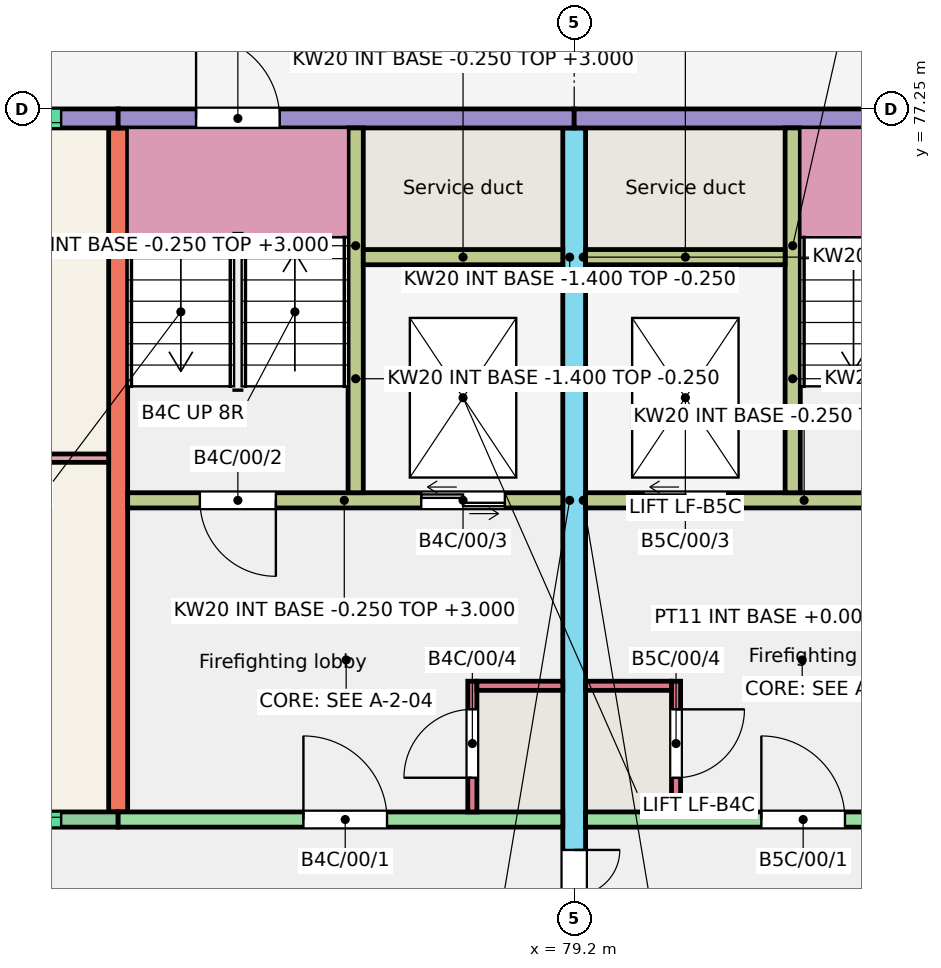
"""IFC4 building model, lengths in metres.
Left out: names, types, materials, properties, quantities, classifications, styles, units other than length and angle.
Written with IfcOpenShell. Run it as: python <this file> out.ifc"""

import sys

from ifc_helpers import new_model, si_unit, direction, frame, frame_2d, origin, place, context, subcontext, project, spatial, rectangle, extrude, element, fill, save


model = new_model("IFC4")
c1 = context("Model", 3, precision=1e-05, world=origin(), true_north=direction((0.0, 1.0)))
c2 = subcontext(c1, "Body", "Model", "MODEL_VIEW")
j1 = project(units=[si_unit("LENGTHUNIT", "METRE"), si_unit("PLANEANGLEUNIT", "RADIAN")], contexts=[c1])
p1 = place(None, origin())
s1 = spatial("IfcSite", under=j1, at=p1, CompositionType="ELEMENT")
p2 = place(p1, origin())
s2 = spatial("IfcBuilding", under=s1, at=p2, CompositionType="ELEMENT")
p3 = place(p2, origin())
s3 = spatial("IfcBuildingStorey", under=s2, at=p3, CompositionType="ELEMENT", Elevation=0.0)
p4 = place(p3, frame((73.2, 68.0, -0.25), z_axis=(0.0, 0.0, 1.0), x_axis=(0.0, 1.0, 0.0)))
e1 = element("IfcWall", 1, at=p4, inside=s3, PredefinedType="SHEAR", context=c2, shape_type="SweptSolid", body=[
    extrude(rectangle(XDim=9.0, YDim=0.25, at=frame_2d((4.5, 0.0))), origin(), (0.0, 0.0, 1.0), 3.25),
])
p5 = place(p3, frame((79.2, 66.0, -0.25), z_axis=(0.0, 0.0, 1.0), x_axis=(0.0, 1.0, 0.0)))
e2 = element("IfcWall", 2, at=p5, inside=s3, PredefinedType="SHEAR", context=c2, shape_type="SweptSolid", body=[
    extrude(rectangle(XDim=11.0, YDim=0.3, at=frame_2d((5.5, 0.0))), origin(), (0.0, 0.0, 1.0), 3.25),
])
p6 = place(p5, frame((0.3, 0.0, 0.25)))
e3 = element("IfcOpeningElement", 3, at=p6, cuts=e2, PredefinedType="OPENING", context=c2, shape_type="SweptSolid", body=[
    extrude(rectangle(XDim=1.2, YDim=2.1, at=frame_2d((0.6, 1.05))), frame((0.0, 0.16, 0.0), z_axis=(0.0, -1.0, 0.0), x_axis=(1.0, 0.0, 0.0)), (0.0, 0.0, 1.0), 0.32),
])
p7 = place(p3, frame((69.6, 77.125, -0.25), z_axis=(0.0, 0.0, 1.0), x_axis=(1.0, 0.0, 0.0)))
e4 = element("IfcWall", 4, at=p7, inside=s3, PredefinedType="SOLIDWALL", context=c2, shape_type="SweptSolid", body=[
    extrude(rectangle(XDim=3.6, YDim=0.25, at=frame_2d((1.8, 0.0))), origin(), (0.0, 0.0, 1.0), 3.25),
])
p8 = place(p7, frame((0.75, 0.0, 1.45)))
e5 = element("IfcOpeningElement", 5, at=p8, cuts=e4, PredefinedType="OPENING", context=c2, shape_type="SweptSolid", body=[
    extrude(rectangle(XDim=2.1, YDim=1.2, at=frame_2d((1.05, 0.6))), frame((0.0, 0.135, 0.0), z_axis=(0.0, -1.0, 0.0), x_axis=(1.0, 0.0, 0.0)), (0.0, 0.0, 1.0), 0.27),
])
p9 = place(p3, frame((69.6, 67.9, -0.25), z_axis=(0.0, 0.0, 1.0), x_axis=(1.0, 0.0, 0.0)))
e6 = element("IfcWall", 6, at=p9, inside=s3, PredefinedType="SOLIDWALL", context=c2, shape_type="SweptSolid", body=[
    extrude(rectangle(XDim=3.6, YDim=0.2, at=frame_2d((1.8, 0.0))), origin(), (0.0, 0.0, 1.0), 3.25),
])
p10 = place(p9, frame((0.75, 0.0, 1.45)))
e7 = element("IfcOpeningElement", 7, at=p10, cuts=e6, PredefinedType="OPENING", context=c2, shape_type="SweptSolid", body=[
    extrude(rectangle(XDim=2.1, YDim=1.2, at=frame_2d((1.05, 0.6))), frame((0.0, 0.11, 0.0), z_axis=(0.0, -1.0, 0.0), x_axis=(1.0, 0.0, 0.0)), (0.0, 0.0, 1.0), 0.22),
])
p11 = place(p3, frame((73.2, 77.125, -0.25), z_axis=(0.0, 0.0, 1.0), x_axis=(1.0, 0.0, 0.0)))
e8 = element("IfcWall", 8, at=p11, inside=s3, PredefinedType="SOLIDWALL", context=c2, shape_type="SweptSolid", body=[
    extrude(rectangle(XDim=6.0, YDim=0.25, at=frame_2d((3.0, 0.0))), origin(), (0.0, 0.0, 1.0), 3.25),
])
p12 = place(p11, frame((1.025, 0.0, 0.25)))
e9 = element("IfcOpeningElement", 9, at=p12, cuts=e8, PredefinedType="OPENING", context=c2, shape_type="SweptSolid", body=[
    extrude(rectangle(XDim=1.1, YDim=2.1, at=frame_2d((0.55, 1.05))), frame((0.0, 0.135, 0.0), z_axis=(0.0, -1.0, 0.0), x_axis=(1.0, 0.0, 0.0)), (0.0, 0.0, 1.0), 0.27),
])
p13 = place(p3, frame((73.2, 67.9, -0.25), z_axis=(0.0, 0.0, 1.0), x_axis=(1.0, 0.0, 0.0)))
e10 = element("IfcWall", 10, at=p13, inside=s3, PredefinedType="SHEAR", context=c2, shape_type="SweptSolid", body=[
    extrude(rectangle(XDim=5.85, YDim=0.2, at=frame_2d((2.925, 0.0))), origin(), (0.0, 0.0, 1.0), 3.25),
])
p14 = place(p13, frame((2.438, 0.0, 0.25)))
e11 = element("IfcOpeningElement", 11, at=p14, cuts=e10, PredefinedType="OPENING", context=c2, shape_type="SweptSolid", body=[
    extrude(rectangle(XDim=1.1, YDim=2.1, at=frame_2d((0.55, 1.05))), frame((0.0, 0.11, 0.0), z_axis=(0.0, -1.0, 0.0), x_axis=(1.0, 0.0, 0.0)), (0.0, 0.0, 1.0), 0.22),
])
p15 = place(p3, frame((73.325, 72.1, -0.25), z_axis=(0.0, 0.0, 1.0), x_axis=(1.0, 0.0, 0.0)))
e12 = element("IfcWall", 12, at=p15, inside=s3, PredefinedType="SHEAR", context=c2, shape_type="SweptSolid", body=[
    extrude(rectangle(XDim=5.725, YDim=0.2, at=frame_2d((2.863, 0.0))), origin(), (0.0, 0.0, 1.0), 3.25),
])
p16 = place(p15, frame((0.95, 0.0, 0.25)))
e13 = element("IfcOpeningElement", 13, at=p16, cuts=e12, PredefinedType="OPENING", context=c2, shape_type="SweptSolid", body=[
    extrude(rectangle(XDim=1.0, YDim=2.1, at=frame_2d((0.5, 1.05))), frame((0.0, 0.11, 0.0), z_axis=(0.0, -1.0, 0.0), x_axis=(1.0, 0.0, 0.0)), (0.0, 0.0, 1.0), 0.22),
])
p17 = place(p15, frame((3.863, 0.0, 0.25)))
e14 = element("IfcOpeningElement", 14, at=p17, cuts=e12, PredefinedType="OPENING", context=c2, shape_type="SweptSolid", body=[
    extrude(rectangle(XDim=1.1, YDim=2.1, at=frame_2d((0.55, 1.05))), frame((0.0, 0.11, 0.0), z_axis=(0.0, -1.0, 0.0), x_axis=(1.0, 0.0, 0.0)), (0.0, 0.0, 1.0), 0.22),
])
p18 = place(p3, frame((76.325, 72.2, -0.25), z_axis=(0.0, 0.0, 1.0), x_axis=(0.0, 1.0, 0.0)))
e15 = element("IfcWall", 15, at=p18, inside=s3, PredefinedType="SHEAR", context=c2, shape_type="SweptSolid", body=[
    extrude(rectangle(XDim=4.8, YDim=0.2, at=frame_2d((2.4, 0.0))), origin(), (0.0, 0.0, 1.0), 3.25),
])
p19 = place(p3, frame((76.425, 75.3, -0.25), z_axis=(0.0, 0.0, 1.0), x_axis=(1.0, 0.0, 0.0)))
e16 = element("IfcWall", 16, at=p19, inside=s3, PredefinedType="SHEAR", context=c2, shape_type="SweptSolid", body=[
    extrude(rectangle(XDim=2.625, YDim=0.2, at=frame_2d((1.312, 0.0))), origin(), (0.0, 0.0, 1.0), 3.25),
])
p20 = place(p3, frame((77.86, 68.0, -0.25), z_axis=(0.0, 0.0, 1.0), x_axis=(0.0, 1.0, 0.0)))
e17 = element("IfcWall", 17, at=p20, inside=s3, PredefinedType="SHEAR", context=c2, shape_type="SweptSolid", body=[
    extrude(rectangle(XDim=1.72, YDim=0.12, at=frame_2d((0.86, 0.0))), origin(), (0.0, 0.0, 1.0), 3.25),
])
p21 = place(p20, frame((0.45, 0.0, 0.25)))
e18 = element("IfcOpeningElement", 18, at=p21, cuts=e17, PredefinedType="OPENING", context=c2, shape_type="SweptSolid", body=[
    extrude(rectangle(XDim=0.9, YDim=2.1, at=frame_2d((0.45, 1.05))), frame((0.0, 0.07, 0.0), z_axis=(0.0, -1.0, 0.0), x_axis=(1.0, 0.0, 0.0)), (0.0, 0.0, 1.0), 0.14),
])
p22 = place(p3, frame((77.92, 69.66, -0.25), z_axis=(0.0, 0.0, 1.0), x_axis=(1.0, 0.0, 0.0)))
e19 = element("IfcWall", 19, at=p22, inside=s3, PredefinedType="SHEAR", context=c2, shape_type="SweptSolid", body=[
    extrude(rectangle(XDim=1.13, YDim=0.12, at=frame_2d((0.565, 0.0))), origin(), (0.0, 0.0, 1.0), 3.25),
])
p23 = place(p3, frame((79.2, 77.125, -0.25), z_axis=(0.0, 0.0, 1.0), x_axis=(1.0, 0.0, 0.0)))
e20 = element("IfcWall", 20, at=p23, inside=s3, PredefinedType="SOLIDWALL", context=c2, shape_type="SweptSolid", body=[
    extrude(rectangle(XDim=6.0, YDim=0.25, at=frame_2d((3.0, 0.0))), origin(), (0.0, 0.0, 1.0), 3.25),
])
p24 = place(p23, frame((3.875, 0.0, 0.25)))
e21 = element("IfcOpeningElement", 21, at=p24, cuts=e20, PredefinedType="OPENING", context=c2, shape_type="SweptSolid", body=[
    extrude(rectangle(XDim=1.1, YDim=2.1, at=frame_2d((0.55, 1.05))), frame((0.0, 0.135, 0.0), z_axis=(0.0, -1.0, 0.0), x_axis=(1.0, 0.0, 0.0)), (0.0, 0.0, 1.0), 0.27),
])
p25 = place(p3, frame((79.35, 67.9, -0.25), z_axis=(0.0, 0.0, 1.0), x_axis=(1.0, 0.0, 0.0)))
e22 = element("IfcWall", 22, at=p25, inside=s3, PredefinedType="SHEAR", context=c2, shape_type="SweptSolid", body=[
    extrude(rectangle(XDim=5.85, YDim=0.2, at=frame_2d((2.925, 0.0))), origin(), (0.0, 0.0, 1.0), 3.25),
])
p26 = place(p25, frame((2.312, 0.0, 0.25)))
e23 = element("IfcOpeningElement", 23, at=p26, cuts=e22, PredefinedType="OPENING", context=c2, shape_type="SweptSolid", body=[
    extrude(rectangle(XDim=1.1, YDim=2.1, at=frame_2d((0.55, 1.05))), frame((0.0, 0.11, 0.0), z_axis=(0.0, -1.0, 0.0), x_axis=(1.0, 0.0, 0.0)), (0.0, 0.0, 1.0), 0.22),
])
p27 = place(p3, frame((79.35, 72.1, -0.25), z_axis=(0.0, 0.0, 1.0), x_axis=(1.0, 0.0, 0.0)))
e24 = element("IfcWall", 24, at=p27, inside=s3, PredefinedType="SHEAR", context=c2, shape_type="SweptSolid", body=[
    extrude(rectangle(XDim=5.725, YDim=0.2, at=frame_2d((2.862, 0.0))), origin(), (0.0, 0.0, 1.0), 3.25),
])
p28 = place(p27, frame((3.775, 0.0, 0.25)))
e25 = element("IfcOpeningElement", 25, at=p28, cuts=e24, PredefinedType="OPENING", context=c2, shape_type="SweptSolid", body=[
    extrude(rectangle(XDim=1.0, YDim=2.1, at=frame_2d((0.5, 1.05))), frame((0.0, 0.11, 0.0), z_axis=(0.0, -1.0, 0.0), x_axis=(1.0, 0.0, 0.0)), (0.0, 0.0, 1.0), 0.22),
])
p29 = place(p27, frame((0.762, 0.0, 0.25)))
e26 = element("IfcOpeningElement", 26, at=p29, cuts=e24, PredefinedType="OPENING", context=c2, shape_type="SweptSolid", body=[
    extrude(rectangle(XDim=1.1, YDim=2.1, at=frame_2d((0.55, 1.05))), frame((0.0, 0.11, 0.0), z_axis=(0.0, -1.0, 0.0), x_axis=(1.0, 0.0, 0.0)), (0.0, 0.0, 1.0), 0.22),
])
p30 = place(p3, frame((82.075, 72.2, -0.25), z_axis=(0.0, 0.0, 1.0), x_axis=(0.0, 1.0, 0.0)))
e27 = element("IfcWall", 27, at=p30, inside=s3, PredefinedType="SHEAR", context=c2, shape_type="SweptSolid", body=[
    extrude(rectangle(XDim=4.8, YDim=0.2, at=frame_2d((2.4, 0.0))), origin(), (0.0, 0.0, 1.0), 3.25),
])
p31 = place(p3, frame((79.35, 75.3, -0.25), z_axis=(0.0, 0.0, 1.0), x_axis=(1.0, 0.0, 0.0)))
e28 = element("IfcWall", 28, at=p31, inside=s3, PredefinedType="SHEAR", context=c2, shape_type="SweptSolid", body=[
    extrude(rectangle(XDim=2.625, YDim=0.2, at=frame_2d((1.312, 0.0))), origin(), (0.0, 0.0, 1.0), 3.25),
])
p32 = place(p3, frame((80.54, 68.0, -0.25), z_axis=(0.0, 0.0, 1.0), x_axis=(0.0, 1.0, 0.0)))
e29 = element("IfcWall", 29, at=p32, inside=s3, PredefinedType="SHEAR", context=c2, shape_type="SweptSolid", body=[
    extrude(rectangle(XDim=1.72, YDim=0.12, at=frame_2d((0.86, 0.0))), origin(), (0.0, 0.0, 1.0), 3.25),
])
p33 = place(p32, frame((0.45, 0.0, 0.25)))
e30 = element("IfcOpeningElement", 30, at=p33, cuts=e29, PredefinedType="OPENING", context=c2, shape_type="SweptSolid", body=[
    extrude(rectangle(XDim=0.9, YDim=2.1, at=frame_2d((0.45, 1.05))), frame((0.0, 0.07, 0.0), z_axis=(0.0, -1.0, 0.0), x_axis=(1.0, 0.0, 0.0)), (0.0, 0.0, 1.0), 0.14),
])
p34 = place(p3, frame((79.35, 69.66, -0.25), z_axis=(0.0, 0.0, 1.0), x_axis=(1.0, 0.0, 0.0)))
e31 = element("IfcWall", 31, at=p34, inside=s3, PredefinedType="SHEAR", context=c2, shape_type="SweptSolid", body=[
    extrude(rectangle(XDim=1.13, YDim=0.12, at=frame_2d((0.565, 0.0))), origin(), (0.0, 0.0, 1.0), 3.25),
])
for number, where, z_axis, x_axis in (
    (32, (76.225, 72.1, -1.4), (0.0, 0.0, 1.0), (1.0, 0.0, 0.0)),
    (33, (76.225, 75.3, -1.4), (0.0, 0.0, 1.0), (1.0, 0.0, 0.0)),
):
    element("IfcWall", number, at=place(p3, frame(where, z_axis=z_axis, x_axis=x_axis)), inside=s3, PredefinedType="SHEAR", context=c2, shape_type="SweptSolid", body=[
        extrude(rectangle(XDim=2.975, YDim=0.2, at=frame_2d((1.487, 0.0))), origin(), (0.0, 0.0, 1.0), 1.15),
    ])
p35 = place(p3, frame((76.325, 72.2, -1.4), z_axis=(0.0, 0.0, 1.0), x_axis=(0.0, 1.0, 0.0)))
e34 = element("IfcWall", 34, at=p35, inside=s3, PredefinedType="SHEAR", context=c2, shape_type="SweptSolid", body=[
    extrude(rectangle(XDim=3.0, YDim=0.2, at=frame_2d((1.5, 0.0))), origin(), (0.0, 0.0, 1.0), 1.15),
])
p36 = place(p3, frame((79.125, 72.2, -1.4), z_axis=(0.0, 0.0, 1.0), x_axis=(0.0, 1.0, 0.0)))
e35 = element("IfcWall", 35, at=p36, inside=s3, PredefinedType="SHEAR", context=c2, shape_type="SweptSolid", body=[
    extrude(rectangle(XDim=3.0, YDim=0.15, at=frame_2d((1.5, 0.0))), origin(), (0.0, 0.0, 1.0), 1.15),
])
for number, where, z_axis, x_axis in (
    (36, (79.2, 72.1, -1.4), (0.0, 0.0, 1.0), (1.0, 0.0, 0.0)),
    (37, (79.2, 75.3, -1.4), (0.0, 0.0, 1.0), (1.0, 0.0, 0.0)),
):
    element("IfcWall", number, at=place(p3, frame(where, z_axis=z_axis, x_axis=x_axis)), inside=s3, PredefinedType="SHEAR", context=c2, shape_type="SweptSolid", body=[
        extrude(rectangle(XDim=2.975, YDim=0.2, at=frame_2d((1.488, 0.0))), origin(), (0.0, 0.0, 1.0), 1.15),
    ])
p37 = place(p3, frame((82.075, 72.2, -1.4), z_axis=(0.0, 0.0, 1.0), x_axis=(0.0, 1.0, 0.0)))
e38 = element("IfcWall", 38, at=p37, inside=s3, PredefinedType="SHEAR", context=c2, shape_type="SweptSolid", body=[
    extrude(rectangle(XDim=3.0, YDim=0.2, at=frame_2d((1.5, 0.0))), origin(), (0.0, 0.0, 1.0), 1.15),
])
p38 = place(p3, frame((79.275, 72.2, -1.4), z_axis=(0.0, 0.0, 1.0), x_axis=(0.0, 1.0, 0.0)))
e39 = element("IfcWall", 39, at=p38, inside=s3, PredefinedType="SHEAR", context=c2, shape_type="SweptSolid", body=[
    extrude(rectangle(XDim=3.0, YDim=0.15, at=frame_2d((1.5, 0.0))), origin(), (0.0, 0.0, 1.0), 1.15),
])
p39 = place(p3, frame((69.725, 72.655, 0.0), z_axis=(0.0, 0.0, 1.0), x_axis=(1.0, 0.0, 0.0)))
e40 = element("IfcWall", 40, at=p39, inside=s3, PredefinedType="PARTITIONING", context=c2, shape_type="SweptSolid", body=[
    extrude(rectangle(XDim=3.35, YDim=0.11, at=frame_2d((1.675, 0.0))), origin(), (0.0, 0.0, 1.0), 2.8),
])
p40 = place(p10, origin())
e41 = element("IfcWindow", 41, at=p40, inside=s3, PartitioningType="SINGLE_PANEL", PredefinedType="WINDOW", context=c2, shape_type="SweptSolid", body=[
    extrude(rectangle(XDim=2.1, YDim=1.2, at=frame_2d((1.05, 0.6))), frame((0.0, 0.06, 0.0), z_axis=(0.0, -1.0, 0.0), x_axis=(1.0, 0.0, 0.0)), (0.0, 0.0, 1.0), 0.06),
])
fill(e7, e41)
p41 = place(p8, origin())
e42 = element("IfcWindow", 42, at=p41, inside=s3, PartitioningType="SINGLE_PANEL", PredefinedType="WINDOW", context=c2, shape_type="SweptSolid", body=[
    extrude(rectangle(XDim=2.1, YDim=1.2, at=frame_2d((1.05, 0.6))), frame((0.0, -0.025, 0.0), z_axis=(0.0, -1.0, 0.0), x_axis=(1.0, 0.0, 0.0)), (0.0, 0.0, 1.0), 0.06),
])
fill(e5, e42)
p42 = place(p14, origin())
e43 = element("IfcDoor", 43, at=p42, inside=s3, OperationType="SINGLE_SWING_LEFT", PredefinedType="DOOR", context=c2, shape_type="SweptSolid", body=[
    extrude(rectangle(XDim=1.1, YDim=2.1, at=frame_2d((0.55, 1.05))), frame((0.0, 0.025, 0.0), z_axis=(0.0, -1.0, 0.0), x_axis=(1.0, 0.0, 0.0)), (0.0, 0.0, 1.0), 0.05),
])
fill(e11, e43)
p43 = place(p16, origin())
e44 = element("IfcDoor", 44, at=p43, inside=s3, OperationType="SINGLE_SWING_RIGHT", PredefinedType="DOOR", context=c2, shape_type="SweptSolid", body=[
    extrude(rectangle(XDim=1.0, YDim=2.1, at=frame_2d((0.5, 1.05))), frame((0.0, 0.025, 0.0), z_axis=(0.0, -1.0, 0.0), x_axis=(1.0, 0.0, 0.0)), (0.0, 0.0, 1.0), 0.05),
])
fill(e13, e44)
p44 = place(p17, origin())
e45 = element("IfcDoor", 45, at=p44, inside=s3, OperationType="DOUBLE_DOOR_SLIDING", PredefinedType="DOOR", context=c2, shape_type="SweptSolid", body=[
    extrude(rectangle(XDim=1.1, YDim=2.1, at=frame_2d((0.55, 1.05))), frame((0.0, 0.025, 0.0), z_axis=(0.0, -1.0, 0.0), x_axis=(1.0, 0.0, 0.0)), (0.0, 0.0, 1.0), 0.05),
])
fill(e14, e45)
p45 = place(p21, origin())
e46 = element("IfcDoor", 46, at=p45, inside=s3, OperationType="SINGLE_SWING_LEFT", PredefinedType="DOOR", context=c2, shape_type="SweptSolid", body=[
    extrude(rectangle(XDim=0.9, YDim=2.1, at=frame_2d((0.45, 1.05))), frame((0.0, 0.025, 0.0), z_axis=(0.0, -1.0, 0.0), x_axis=(1.0, 0.0, 0.0)), (0.0, 0.0, 1.0), 0.05),
])
fill(e18, e46)
p46 = place(p12, origin())
e47 = element("IfcDoor", 47, at=p46, inside=s3, OperationType="SINGLE_SWING_LEFT", PredefinedType="DOOR", context=c2, shape_type="SweptSolid", body=[
    extrude(rectangle(XDim=1.1, YDim=2.1, at=frame_2d((0.55, 1.05))), frame((0.0, 0.025, 0.0), z_axis=(0.0, -1.0, 0.0), x_axis=(1.0, 0.0, 0.0)), (0.0, 0.0, 1.0), 0.05),
])
fill(e9, e47)
p47 = place(p26, origin())
e48 = element("IfcDoor", 48, at=p47, inside=s3, OperationType="SINGLE_SWING_LEFT", PredefinedType="DOOR", context=c2, shape_type="SweptSolid", body=[
    extrude(rectangle(XDim=1.1, YDim=2.1, at=frame_2d((0.55, 1.05))), frame((0.0, 0.025, 0.0), z_axis=(0.0, -1.0, 0.0), x_axis=(1.0, 0.0, 0.0)), (0.0, 0.0, 1.0), 0.05),
])
fill(e23, e48)
p48 = place(p29, origin())
e49 = element("IfcDoor", 49, at=p48, inside=s3, OperationType="DOUBLE_DOOR_SLIDING", PredefinedType="DOOR", context=c2, shape_type="SweptSolid", body=[
    extrude(rectangle(XDim=1.1, YDim=2.1, at=frame_2d((0.55, 1.05))), frame((0.0, 0.025, 0.0), z_axis=(0.0, -1.0, 0.0), x_axis=(1.0, 0.0, 0.0)), (0.0, 0.0, 1.0), 0.05),
])
fill(e26, e49)
p49 = place(p33, origin())
e50 = element("IfcDoor", 50, at=p49, inside=s3, OperationType="SINGLE_SWING_RIGHT", PredefinedType="DOOR", context=c2, shape_type="SweptSolid", body=[
    extrude(rectangle(XDim=0.9, YDim=2.1, at=frame_2d((0.45, 1.05))), frame((0.0, 0.025, 0.0), z_axis=(0.0, -1.0, 0.0), x_axis=(1.0, 0.0, 0.0)), (0.0, 0.0, 1.0), 0.05),
])
fill(e30, e50)
p50 = place(p6, origin())
e51 = element("IfcDoor", 51, at=p50, inside=s3, OperationType="DOUBLE_DOOR_SINGLE_SWING", PredefinedType="DOOR", context=c2, shape_type="SweptSolid", body=[
    extrude(rectangle(XDim=1.2, YDim=2.1, at=frame_2d((0.6, 1.05))), frame((0.0, 0.025, 0.0), z_axis=(0.0, -1.0, 0.0), x_axis=(1.0, 0.0, 0.0)), (0.0, 0.0, 1.0), 0.05),
])
fill(e3, e51)
save(model, sys.argv[1])
